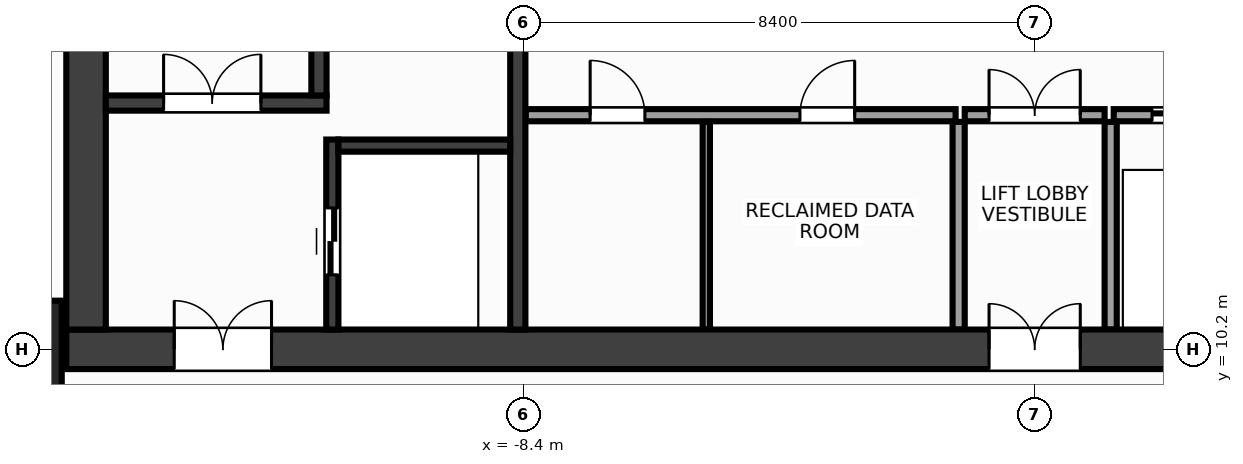
"""IFC4 building model, lengths in metres.
Left out: names, types, materials, properties, quantities, classifications, styles, units other than length and angle.
Written with IfcOpenShell. Run it as: python <this file> out.ifc"""

import sys

from ifc_helpers import new_model, si_unit, direction, frame, frame_2d, origin, origin_2d, place, context, subcontext, project, spatial, rectangle, extrude, source, transform, mapped, element, fill, save


model = new_model("IFC4")
c1 = context("Model", 3, precision=1e-05, world=origin(), true_north=direction((0.0, 1.0)))
c2 = subcontext(c1, "Body", "Model", "MODEL_VIEW")
j1 = project(units=[si_unit("LENGTHUNIT", "METRE"), si_unit("PLANEANGLEUNIT", "RADIAN")], contexts=[c1])
p1 = place(None, origin())
s1 = spatial("IfcSite", under=j1, at=p1, CompositionType="ELEMENT")
p2 = place(p1, origin())
s2 = spatial("IfcBuilding", under=s1, at=p2, CompositionType="ELEMENT")
p3 = place(p2, frame((0.0, 0.0, 99.2)))
s3 = spatial("IfcBuildingStorey", under=s2, at=p3, CompositionType="ELEMENT", Elevation=99.2)
m1 = source(origin(), c2, "Body", "SweptSolid", [
    extrude(rectangle(XDim=31.85, YDim=0.65, at=frame_2d((15.925, 0.0))), origin(), (0.0, 0.0, 1.0), 3.6),
])
p4 = place(p3, frame((-15.925, 10.2, 0.0), z_axis=(0.0, 0.0, 1.0), x_axis=(1.0, 0.0, 0.0)))
e1 = element("IfcWall", 1, at=p4, inside=s3, PredefinedType="SHEAR", context=c2, shape_type="MappedRepresentation", body=[
    mapped(m1, transform((0.0, 0.0, 0.0), x_axis=(1.0, 0.0, 0.0), y_axis=(0.0, 1.0, 0.0), z_axis=(0.0, 0.0, 1.0), scale=1.0)),
])
p5 = place(p4, frame((1.775, 0.0, 0.0)))
e2 = element("IfcOpeningElement", 2, at=p5, cuts=e1, PredefinedType="OPENING", context=c2, shape_type="SweptSolid", body=[
    extrude(rectangle(XDim=1.6, YDim=2.15, at=frame_2d((0.8, 1.075))), frame((0.0, 0.337, 0.0), z_axis=(0.0, -1.0, 0.0), x_axis=(1.0, 0.0, 0.0)), (0.0, 0.0, 1.0), 0.674),
])
p6 = place(p4, frame((28.475, 0.0, 0.0)))
e3 = element("IfcOpeningElement", 3, at=p6, cuts=e1, PredefinedType="OPENING", context=c2, shape_type="SweptSolid", body=[
    extrude(rectangle(XDim=1.6, YDim=2.15, at=frame_2d((0.8, 1.075))), frame((0.0, 0.337, 0.0), z_axis=(0.0, -1.0, 0.0), x_axis=(1.0, 0.0, 0.0)), (0.0, 0.0, 1.0), 0.674),
])
p7 = place(p4, frame((15.175, 0.0, 0.0)))
e4 = element("IfcOpeningElement", 4, at=p7, cuts=e1, PredefinedType="OPENING", context=c2, shape_type="SweptSolid", body=[
    extrude(rectangle(XDim=1.5, YDim=2.2, at=frame_2d((0.75, 1.1))), frame((0.0, 0.337, 0.0), z_axis=(0.0, -1.0, 0.0), x_axis=(1.0, 0.0, 0.0)), (0.0, 0.0, 1.0), 0.674),
])
m2 = source(origin(), c2, "Body", "SweptSolid", [
    extrude(rectangle(XDim=12.95, YDim=0.65, at=frame_2d((6.475, 0.0))), origin(), (0.0, 0.0, 1.0), 3.6),
])
p8 = place(p3, frame((-15.6, 10.525, 0.0), z_axis=(0.0, 0.0, 1.0), x_axis=(0.0, 1.0, 0.0)))
e5 = element("IfcWall", 5, at=p8, inside=s3, PredefinedType="SHEAR", context=c2, shape_type="MappedRepresentation", body=[
    mapped(m2, transform((0.0, 0.0, 0.0), x_axis=(1.0, 0.0, 0.0), y_axis=(0.0, 1.0, 0.0), z_axis=(0.0, 0.0, 1.0), scale=1.0)),
])
m3 = source(origin(), c2, "Body", "SweptSolid", [
    extrude(rectangle(XDim=12.95, YDim=0.25, at=frame_2d((6.475, 0.0))), origin(), (0.0, 0.0, 1.0), 3.6),
])
p9 = place(p3, frame((-8.5, 10.525, 0.0), z_axis=(0.0, 0.0, 1.0), x_axis=(0.0, 1.0, 0.0)))
e6 = element("IfcWall", 6, at=p9, inside=s3, PredefinedType="SHEAR", context=c2, shape_type="MappedRepresentation", body=[
    mapped(m3, transform((0.0, 0.0, 0.0), x_axis=(1.0, 0.0, 0.0), y_axis=(0.0, 1.0, 0.0), z_axis=(0.0, 0.0, 1.0), scale=1.0)),
])
p10 = place(p9, frame((5.075, 0.0, 0.0)))
e7 = element("IfcOpeningElement", 7, at=p10, cuts=e6, PredefinedType="OPENING", context=c2, shape_type="SweptSolid", body=[
    extrude(rectangle(XDim=0.95, YDim=2.15, at=frame_2d((0.475, 1.075))), frame((0.0, 0.137, 0.0), z_axis=(0.0, -1.0, 0.0), x_axis=(1.0, 0.0, 0.0)), (0.0, 0.0, 1.0), 0.274),
])
p11 = place(p9, frame((8.175, 0.0, 0.0)))
e8 = element("IfcOpeningElement", 8, at=p11, cuts=e6, PredefinedType="OPENING", context=c2, shape_type="SweptSolid", body=[
    extrude(rectangle(XDim=0.95, YDim=2.15, at=frame_2d((0.475, 1.075))), frame((0.0, 0.137, 0.0), z_axis=(0.0, -1.0, 0.0), x_axis=(1.0, 0.0, 0.0)), (0.0, 0.0, 1.0), 0.274),
])
m4 = source(origin(), c2, "Body", "SweptSolid", [
    extrude(rectangle(XDim=3.63, YDim=0.25, at=frame_2d((1.815, 0.0))), origin(), (0.0, 0.0, 1.0), 3.6),
])
p12 = place(p3, frame((-15.275, 14.25, 0.0), z_axis=(0.0, 0.0, 1.0), x_axis=(1.0, 0.0, 0.0)))
e9 = element("IfcWall", 9, at=p12, inside=s3, PredefinedType="SHEAR", context=c2, shape_type="MappedRepresentation", body=[
    mapped(m4, transform((0.0, 0.0, 0.0), x_axis=(1.0, 0.0, 0.0), y_axis=(0.0, 1.0, 0.0), z_axis=(0.0, 0.0, 1.0), scale=1.0)),
])
p13 = place(p12, frame((0.95, 0.0, 0.0)))
e10 = element("IfcOpeningElement", 10, at=p13, cuts=e9, PredefinedType="OPENING", context=c2, shape_type="SweptSolid", body=[
    extrude(rectangle(XDim=1.6, YDim=2.15, at=frame_2d((0.8, 1.075))), frame((0.0, 0.137, 0.0), z_axis=(0.0, -1.0, 0.0), x_axis=(1.0, 0.0, 0.0)), (0.0, 0.0, 1.0), 0.274),
])
m5 = source(origin(), c2, "Body", "SweptSolid", [
    extrude(rectangle(XDim=9.1, YDim=0.25, at=frame_2d((4.55, 0.0))), origin(), (0.0, 0.0, 1.0), 3.6),
])
p14 = place(p3, frame((-11.77, 14.375, 0.0), z_axis=(0.0, 0.0, 1.0), x_axis=(0.0, 1.0, 0.0)))
e11 = element("IfcWall", 11, at=p14, inside=s3, PredefinedType="SHEAR", context=c2, shape_type="MappedRepresentation", body=[
    mapped(m5, transform((0.0, 0.0, 0.0), x_axis=(1.0, 0.0, 0.0), y_axis=(0.0, 1.0, 0.0), z_axis=(0.0, 0.0, 1.0), scale=1.0)),
])
m6 = source(origin(), c2, "Body", "SweptSolid", [
    extrude(rectangle(XDim=3.125, YDim=0.2, at=frame_2d((1.562, 0.0))), origin(), (0.0, 0.0, 1.0), 3.6),
])
p15 = place(p3, frame((-11.55, 10.525, 0.0), z_axis=(0.0, 0.0, 1.0), x_axis=(0.0, 1.0, 0.0)))
e12 = element("IfcWall", 12, at=p15, inside=s3, PredefinedType="SHEAR", context=c2, shape_type="MappedRepresentation", body=[
    mapped(m6, transform((0.0, 0.0, 0.0), x_axis=(1.0, 0.0, 0.0), y_axis=(0.0, 1.0, 0.0), z_axis=(0.0, 0.0, 1.0), scale=1.0)),
])
p16 = place(p15, frame((0.9, 0.0, 0.0)))
e13 = element("IfcOpeningElement", 13, at=p16, cuts=e12, PredefinedType="OPENING", context=c2, shape_type="SweptSolid", body=[
    extrude(rectangle(XDim=1.1, YDim=2.15, at=frame_2d((0.55, 1.075))), frame((0.0, 0.112, 0.0), z_axis=(0.0, -1.0, 0.0), x_axis=(1.0, 0.0, 0.0)), (0.0, 0.0, 1.0), 0.224),
])
m7 = source(origin(), c2, "Body", "SweptSolid", [
    extrude(rectangle(XDim=2.825, YDim=0.2, at=frame_2d((1.413, 0.0))), origin(), (0.0, 0.0, 1.0), 3.6),
])
p17 = place(p3, frame((-11.45, 13.55, 0.0), z_axis=(0.0, 0.0, 1.0), x_axis=(1.0, 0.0, 0.0)))
e14 = element("IfcWall", 14, at=p17, inside=s3, PredefinedType="SHEAR", context=c2, shape_type="MappedRepresentation", body=[
    mapped(m7, transform((0.0, 0.0, 0.0), x_axis=(1.0, 0.0, 0.0), y_axis=(0.0, 1.0, 0.0), z_axis=(0.0, 0.0, 1.0), scale=1.0)),
])
m8 = source(origin(), c2, "Body", "SweptSolid", [
    extrude(rectangle(XDim=1.6, YDim=1.6, at=origin_2d()), origin(), (0.0, 0.0, 1.0), 3.6),
])
p18 = place(p3, frame((-16.8, 10.2, 0.0), z_axis=(0.0, 0.0, 1.0), x_axis=(1.0, 0.0, 0.0)))
e15 = element("IfcColumn", 15, at=p18, inside=s3, PredefinedType="COLUMN", context=c2, shape_type="MappedRepresentation", body=[
    mapped(m8, transform((0.0, 0.0, 0.0), x_axis=(1.0, 0.0, 0.0), y_axis=(0.0, 1.0, 0.0), z_axis=(0.0, 0.0, 1.0), scale=1.0)),
])
m9 = source(origin(), c2, "Body", "SweptSolid", [
    extrude(rectangle(XDim=7.07, YDim=0.2, at=frame_2d((3.535, 0.0))), origin(), (0.0, 0.0, 1.0), 3.36),
])
p19 = place(p3, frame((-8.37, 14.05, 0.0), z_axis=(0.0, 0.0, 1.0), x_axis=(1.0, 0.0, 0.0)))
e16 = element("IfcWall", 16, at=p19, inside=s3, PredefinedType="PARTITIONING", context=c2, shape_type="MappedRepresentation", body=[
    mapped(m9, transform((0.0, 0.0, 0.0), x_axis=(1.0, 0.0, 0.0), y_axis=(0.0, 1.0, 0.0), z_axis=(0.0, 0.0, 1.0), scale=1.0)),
])
p20 = place(p19, frame((1.06, 0.0, 0.0)))
e17 = element("IfcOpeningElement", 17, at=p20, cuts=e16, PredefinedType="OPENING", context=c2, shape_type="SweptSolid", body=[
    extrude(rectangle(XDim=0.9, YDim=2.15, at=frame_2d((0.45, 1.075))), frame((0.0, 0.112, 0.0), z_axis=(0.0, -1.0, 0.0), x_axis=(1.0, 0.0, 0.0)), (0.0, 0.0, 1.0), 0.224),
])
p21 = place(p19, frame((4.51, 0.0, 0.0)))
e18 = element("IfcOpeningElement", 18, at=p21, cuts=e16, PredefinedType="OPENING", context=c2, shape_type="SweptSolid", body=[
    extrude(rectangle(XDim=0.9, YDim=2.15, at=frame_2d((0.45, 1.075))), frame((0.0, 0.112, 0.0), z_axis=(0.0, -1.0, 0.0), x_axis=(1.0, 0.0, 0.0)), (0.0, 0.0, 1.0), 0.224),
])
p22 = place(p3, frame((1.3, 14.05, 0.0), z_axis=(0.0, 0.0, 1.0), x_axis=(1.0, 0.0, 0.0)))
e19 = element("IfcWall", 19, at=p22, inside=s3, PredefinedType="PARTITIONING", context=c2, shape_type="MappedRepresentation", body=[
    mapped(m9, transform((0.0, 0.0, 0.0), x_axis=(1.0, 0.0, 0.0), y_axis=(0.0, 1.0, 0.0), z_axis=(0.0, 0.0, 1.0), scale=1.0)),
])
p23 = place(p22, frame((0.63, 0.0, 0.0)))
e20 = element("IfcOpeningElement", 20, at=p23, cuts=e19, PredefinedType="OPENING", context=c2, shape_type="SweptSolid", body=[
    extrude(rectangle(XDim=1.1, YDim=2.15, at=frame_2d((0.55, 1.075))), frame((0.0, 0.112, 0.0), z_axis=(0.0, -1.0, 0.0), x_axis=(1.0, 0.0, 0.0)), (0.0, 0.0, 1.0), 0.224),
])
p24 = place(p22, frame((2.98, 0.0, 0.0)))
e21 = element("IfcOpeningElement", 21, at=p24, cuts=e19, PredefinedType="OPENING", context=c2, shape_type="SweptSolid", body=[
    extrude(rectangle(XDim=1.1, YDim=2.15, at=frame_2d((0.55, 1.075))), frame((0.0, 0.112, 0.0), z_axis=(0.0, -1.0, 0.0), x_axis=(1.0, 0.0, 0.0)), (0.0, 0.0, 1.0), 0.224),
])
p25 = place(p22, frame((5.33, 0.0, 0.0)))
e22 = element("IfcOpeningElement", 22, at=p25, cuts=e19, PredefinedType="OPENING", context=c2, shape_type="SweptSolid", body=[
    extrude(rectangle(XDim=1.1, YDim=2.15, at=frame_2d((0.55, 1.075))), frame((0.0, 0.112, 0.0), z_axis=(0.0, -1.0, 0.0), x_axis=(1.0, 0.0, 0.0)), (0.0, 0.0, 1.0), 0.224),
])
m10 = source(origin(), c2, "Body", "SweptSolid", [
    extrude(rectangle(XDim=3.415, YDim=0.2, at=frame_2d((1.708, 0.0))), origin(), (0.0, 0.0, 1.0), 3.36),
])
for number, where, z_axis, x_axis in (
    (23, (-1.25, 10.525, 0.0), (0.0, 0.0, 1.0), (0.0, 1.0, 0.0)),
    (24, (1.25, 10.525, 0.0), (0.0, 0.0, 1.0), (0.0, 1.0, 0.0)),
):
    element("IfcWall", number, at=place(p3, frame(where, z_axis=z_axis, x_axis=x_axis)), inside=s3, PredefinedType="PARTITIONING", context=c2, shape_type="MappedRepresentation", body=[
        mapped(m10, transform((0.0, 0.0, 0.0), x_axis=(1.0, 0.0, 0.0), y_axis=(0.0, 1.0, 0.0), z_axis=(0.0, 0.0, 1.0), scale=1.0)),
    ])
m11 = source(origin(), c2, "Body", "SweptSolid", [
    extrude(rectangle(XDim=2.3, YDim=0.2, at=frame_2d((1.15, 0.0))), origin(), (0.0, 0.0, 1.0), 3.36),
])
p26 = place(p3, frame((-1.15, 14.05, 0.0), z_axis=(0.0, 0.0, 1.0), x_axis=(1.0, 0.0, 0.0)))
e25 = element("IfcWall", 25, at=p26, inside=s3, PredefinedType="PARTITIONING", context=c2, shape_type="MappedRepresentation", body=[
    mapped(m11, transform((0.0, 0.0, 0.0), x_axis=(1.0, 0.0, 0.0), y_axis=(0.0, 1.0, 0.0), z_axis=(0.0, 0.0, 1.0), scale=1.0)),
])
p27 = place(p26, frame((0.4, 0.0, 0.0)))
e26 = element("IfcOpeningElement", 26, at=p27, cuts=e25, PredefinedType="OPENING", context=c2, shape_type="SweptSolid", body=[
    extrude(rectangle(XDim=1.5, YDim=2.2, at=frame_2d((0.75, 1.1))), frame((0.0, 0.112, 0.0), z_axis=(0.0, -1.0, 0.0), x_axis=(1.0, 0.0, 0.0)), (0.0, 0.0, 1.0), 0.224),
])
m12 = source(origin(), c2, "Body", "SweptSolid", [
    extrude(rectangle(XDim=3.415, YDim=0.12, at=frame_2d((1.708, 0.0))), origin(), (0.0, 0.0, 1.0), 3.36),
])
p28 = place(p3, frame((-5.4, 10.525, 0.0), z_axis=(0.0, 0.0, 1.0), x_axis=(0.0, 1.0, 0.0)))
e27 = element("IfcWall", 27, at=p28, inside=s3, PredefinedType="PARTITIONING", context=c2, shape_type="MappedRepresentation", body=[
    mapped(m12, transform((0.0, 0.0, 0.0), x_axis=(1.0, 0.0, 0.0), y_axis=(0.0, 1.0, 0.0), z_axis=(0.0, 0.0, 1.0), scale=1.0)),
])
m13 = source(origin(), c2, "Body", "SweptSolid", [
    extrude(rectangle(XDim=1.6, YDim=2.15, at=frame_2d((0.8, 1.075))), frame((0.0, 0.025, 0.0), z_axis=(0.0, -1.0, 0.0), x_axis=(1.0, 0.0, 0.0)), (0.0, 0.0, 1.0), 0.05),
])
p29 = place(p13, origin())
e28 = element("IfcDoor", 28, at=p29, inside=s3, OperationType="DOUBLE_DOOR_SINGLE_SWING", PredefinedType="DOOR", context=c2, shape_type="MappedRepresentation", body=[
    mapped(m13, transform((0.0, 0.0, 0.0), x_axis=(1.0, 0.0, 0.0), y_axis=(0.0, 1.0, 0.0), z_axis=(0.0, 0.0, 1.0), scale=1.0)),
])
fill(e10, e28)
p30 = place(p5, origin())
e29 = element("IfcDoor", 29, at=p30, inside=s3, OperationType="DOUBLE_DOOR_SINGLE_SWING", PredefinedType="DOOR", context=c2, shape_type="MappedRepresentation", body=[
    mapped(m13, transform((0.0, 0.0, 0.0), x_axis=(1.0, 0.0, 0.0), y_axis=(0.0, 1.0, 0.0), z_axis=(0.0, 0.0, 1.0), scale=1.0)),
])
fill(e2, e29)
m14 = source(origin(), c2, "Body", "SweptSolid", [
    extrude(rectangle(XDim=1.1, YDim=2.15, at=frame_2d((0.55, 1.075))), frame((0.0, 0.025, 0.0), z_axis=(0.0, -1.0, 0.0), x_axis=(1.0, 0.0, 0.0)), (0.0, 0.0, 1.0), 0.05),
])
p31 = place(p16, origin())
e30 = element("IfcDoor", 30, at=p31, inside=s3, OperationType="DOUBLE_DOOR_SLIDING", PredefinedType="DOOR", context=c2, shape_type="MappedRepresentation", body=[
    mapped(m14, transform((0.0, 0.0, 0.0), x_axis=(1.0, 0.0, 0.0), y_axis=(0.0, 1.0, 0.0), z_axis=(0.0, 0.0, 1.0), scale=1.0)),
])
fill(e13, e30)
m15 = source(origin(), c2, "Body", "SweptSolid", [
    extrude(rectangle(XDim=0.9, YDim=2.15, at=frame_2d((0.45, 1.075))), frame((0.0, 0.025, 0.0), z_axis=(0.0, -1.0, 0.0), x_axis=(1.0, 0.0, 0.0)), (0.0, 0.0, 1.0), 0.05),
])
p32 = place(p20, origin())
e31 = element("IfcDoor", 31, at=p32, inside=s3, OperationType="SINGLE_SWING_LEFT", PredefinedType="DOOR", context=c2, shape_type="MappedRepresentation", body=[
    mapped(m15, transform((0.0, 0.0, 0.0), x_axis=(1.0, 0.0, 0.0), y_axis=(0.0, 1.0, 0.0), z_axis=(0.0, 0.0, 1.0), scale=1.0)),
])
fill(e17, e31)
p33 = place(p21, origin())
e32 = element("IfcDoor", 32, at=p33, inside=s3, OperationType="SINGLE_SWING_RIGHT", PredefinedType="DOOR", context=c2, shape_type="MappedRepresentation", body=[
    mapped(m15, transform((0.0, 0.0, 0.0), x_axis=(1.0, 0.0, 0.0), y_axis=(0.0, 1.0, 0.0), z_axis=(0.0, 0.0, 1.0), scale=1.0)),
])
fill(e18, e32)
p34 = place(p23, origin())
e33 = element("IfcDoor", 33, at=p34, inside=s3, OperationType="DOUBLE_DOOR_SLIDING", PredefinedType="DOOR", context=c2, shape_type="MappedRepresentation", body=[
    mapped(m14, transform((0.0, 0.0, 0.0), x_axis=(1.0, 0.0, 0.0), y_axis=(0.0, 1.0, 0.0), z_axis=(0.0, 0.0, 1.0), scale=1.0)),
])
fill(e20, e33)
m16 = source(origin(), c2, "Body", "SweptSolid", [
    extrude(rectangle(XDim=1.5, YDim=2.2, at=frame_2d((0.75, 1.1))), frame((0.0, 0.025, 0.0), z_axis=(0.0, -1.0, 0.0), x_axis=(1.0, 0.0, 0.0)), (0.0, 0.0, 1.0), 0.05),
])
p35 = place(p27, origin())
e34 = element("IfcDoor", 34, at=p35, inside=s3, OperationType="DOUBLE_DOOR_SINGLE_SWING", PredefinedType="DOOR", context=c2, shape_type="MappedRepresentation", body=[
    mapped(m16, transform((0.0, 0.0, 0.0), x_axis=(1.0, 0.0, 0.0), y_axis=(0.0, 1.0, 0.0), z_axis=(0.0, 0.0, 1.0), scale=1.0)),
])
fill(e26, e34)
p36 = place(p7, origin())
e35 = element("IfcDoor", 35, at=p36, inside=s3, OperationType="DOUBLE_DOOR_SINGLE_SWING", PredefinedType="DOOR", context=c2, shape_type="MappedRepresentation", body=[
    mapped(m16, transform((0.0, 0.0, 0.0), x_axis=(1.0, 0.0, 0.0), y_axis=(0.0, 1.0, 0.0), z_axis=(0.0, 0.0, 1.0), scale=1.0)),
])
fill(e4, e35)
save(model, sys.argv[1])
